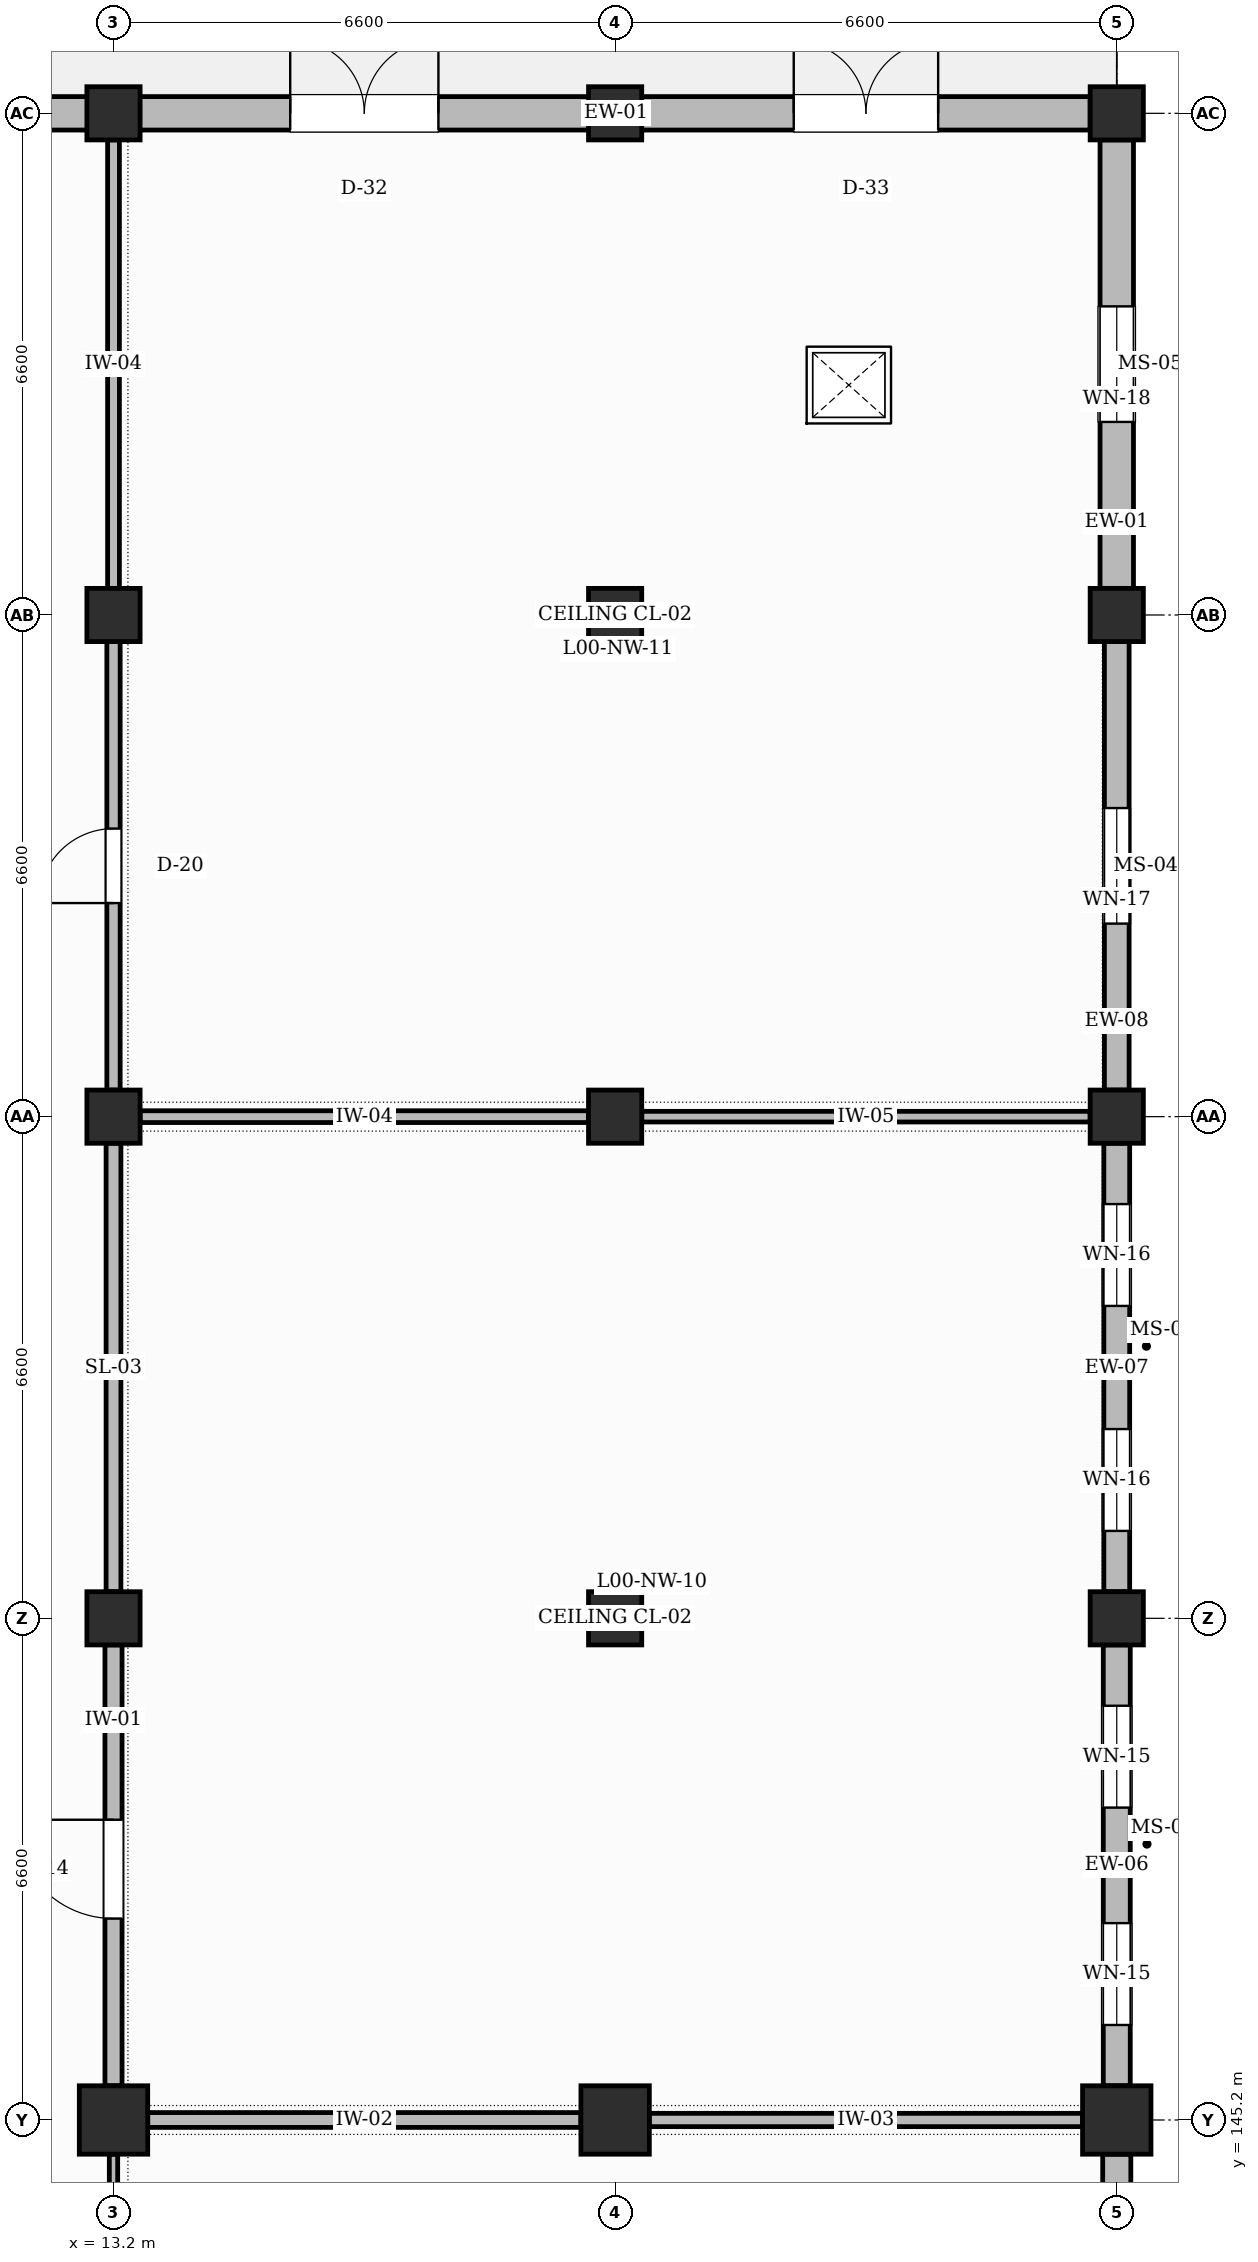
"""IFC4 building model, lengths in metres.
Left out: names, types, materials, properties, quantities, classifications, styles, units other than length and angle.
Written with IfcOpenShell. Run it as: python <this file> out.ifc"""

import sys

from ifc_helpers import new_model, si_unit, direction, frame, frame_2d, origin, origin_2d, place, context, subcontext, project, spatial, rectangle, circle, extrude, element, fill, save


model = new_model("IFC4")
c1 = context("Model", 3, precision=1e-05, world=origin(), true_north=direction((0.0, 1.0)))
c2 = subcontext(c1, "Body", "Model", "MODEL_VIEW")
j1 = project(units=[si_unit("LENGTHUNIT", "METRE"), si_unit("PLANEANGLEUNIT", "RADIAN")], contexts=[c1])
p1 = place(None, origin())
s1 = spatial("IfcSite", under=j1, at=p1, CompositionType="ELEMENT")
p2 = place(p1, origin())
s2 = spatial("IfcBuilding", under=s1, at=p2, CompositionType="ELEMENT")
p3 = place(p2, origin())
s3 = spatial("IfcBuildingStorey", under=s2, at=p3, CompositionType="ELEMENT", Elevation=0.0)
p4 = place(p3, frame((13.2, 145.2, 0.0), z_axis=(0.0, 0.0, 1.0), x_axis=(1.0, 0.0, 0.0)))
e1 = element("IfcColumn", 1, at=p4, inside=s3, PredefinedType="COLUMN", context=c2, shape_type="SweptSolid", body=[
    extrude(rectangle(XDim=0.9, YDim=0.9, at=origin_2d()), origin(), (0.0, 0.0, 1.0), 5.4),
])
for number, where, z_axis, x_axis in (
    (2, (13.2, 151.8, 0.0), (0.0, 0.0, 1.0), (1.0, 0.0, 0.0)),
    (3, (13.2, 158.4, 0.0), (0.0, 0.0, 1.0), (1.0, 0.0, 0.0)),
    (4, (13.2, 165.0, 0.0), (0.0, 0.0, 1.0), (1.0, 0.0, 0.0)),
    (5, (13.2, 171.6, 0.0), (0.0, 0.0, 1.0), (1.0, 0.0, 0.0)),
):
    element("IfcColumn", number, at=place(p3, frame(where, z_axis=z_axis, x_axis=x_axis)), inside=s3, PredefinedType="COLUMN", context=c2, shape_type="SweptSolid", body=[
        extrude(circle(Radius=0.35, at=origin_2d()), origin(), (0.0, 0.0, 1.0), 5.4),
    ])
p5 = place(p3, frame((19.8, 145.2, 0.0), z_axis=(0.0, 0.0, 1.0), x_axis=(1.0, 0.0, 0.0)))
e6 = element("IfcColumn", 6, at=p5, inside=s3, PredefinedType="COLUMN", context=c2, shape_type="SweptSolid", body=[
    extrude(rectangle(XDim=0.9, YDim=0.9, at=origin_2d()), origin(), (0.0, 0.0, 1.0), 5.4),
])
for number, where, z_axis, x_axis in (
    (7, (19.8, 151.8, 0.0), (0.0, 0.0, 1.0), (1.0, 0.0, 0.0)),
    (8, (19.8, 158.4, 0.0), (0.0, 0.0, 1.0), (1.0, 0.0, 0.0)),
    (9, (19.8, 165.0, 0.0), (0.0, 0.0, 1.0), (1.0, 0.0, 0.0)),
    (10, (19.8, 171.6, 0.0), (0.0, 0.0, 1.0), (1.0, 0.0, 0.0)),
):
    element("IfcColumn", number, at=place(p3, frame(where, z_axis=z_axis, x_axis=x_axis)), inside=s3, PredefinedType="COLUMN", context=c2, shape_type="SweptSolid", body=[
        extrude(circle(Radius=0.35, at=origin_2d()), origin(), (0.0, 0.0, 1.0), 5.4),
    ])
p6 = place(p3, frame((26.4, 145.2, 0.0), z_axis=(0.0, 0.0, 1.0), x_axis=(1.0, 0.0, 0.0)))
e11 = element("IfcColumn", 11, at=p6, inside=s3, PredefinedType="COLUMN", context=c2, shape_type="SweptSolid", body=[
    extrude(rectangle(XDim=0.9, YDim=0.9, at=origin_2d()), origin(), (0.0, 0.0, 1.0), 5.4),
])
for number, where, z_axis, x_axis in (
    (12, (26.4, 151.8, 0.0), (0.0, 0.0, 1.0), (1.0, 0.0, 0.0)),
    (13, (26.4, 158.4, 0.0), (0.0, 0.0, 1.0), (1.0, 0.0, 0.0)),
    (14, (26.4, 165.0, 0.0), (0.0, 0.0, 1.0), (1.0, 0.0, 0.0)),
    (15, (26.4, 171.6, 0.0), (0.0, 0.0, 1.0), (1.0, 0.0, 0.0)),
):
    element("IfcColumn", number, at=place(p3, frame(where, z_axis=z_axis, x_axis=x_axis)), inside=s3, PredefinedType="COLUMN", context=c2, shape_type="SweptSolid", body=[
        extrude(circle(Radius=0.35, at=origin_2d()), origin(), (0.0, 0.0, 1.0), 5.4),
    ])
p7 = place(p3, frame((6.95, 171.6, 0.0), z_axis=(0.0, 0.0, 1.0), x_axis=(1.0, 0.0, 0.0)))
e16 = element("IfcWall", 16, at=p7, inside=s3, PredefinedType="SOLIDWALL", context=c2, shape_type="SweptSolid", body=[
    extrude(rectangle(XDim=5.9, YDim=0.44, at=frame_2d((2.95, 0.0))), origin(), (0.0, 0.0, 1.0), 4.45),
])
p8 = place(p7, frame((1.95, 0.0, 0.0)))
e17 = element("IfcOpeningElement", 17, at=p8, cuts=e16, PredefinedType="OPENING", context=c2, shape_type="SweptSolid", body=[
    extrude(rectangle(XDim=2.0, YDim=2.5, at=frame_2d((1.0, 1.25))), frame((0.0, 0.23, 0.0), z_axis=(0.0, -1.0, 0.0), x_axis=(1.0, 0.0, 0.0)), (0.0, 0.0, 1.0), 0.46),
])
p9 = place(p3, frame((13.55, 171.6, 0.0), z_axis=(0.0, 0.0, 1.0), x_axis=(1.0, 0.0, 0.0)))
e18 = element("IfcWall", 18, at=p9, inside=s3, PredefinedType="SOLIDWALL", context=c2, shape_type="SweptSolid", body=[
    extrude(rectangle(XDim=5.9, YDim=0.44, at=frame_2d((2.95, 0.0))), origin(), (0.0, 0.0, 1.0), 4.45),
])
p10 = place(p9, frame((1.975, 0.0, 0.0)))
e19 = element("IfcOpeningElement", 19, at=p10, cuts=e18, PredefinedType="OPENING", context=c2, shape_type="SweptSolid", body=[
    extrude(rectangle(XDim=1.95, YDim=2.45, at=frame_2d((0.975, 1.225))), frame((0.0, 0.23, 0.0), z_axis=(0.0, -1.0, 0.0), x_axis=(1.0, 0.0, 0.0)), (0.0, 0.0, 1.0), 0.46),
])
p11 = place(p3, frame((26.4, 139.05, 0.0), z_axis=(0.0, 0.0, 1.0), x_axis=(0.0, 1.0, 0.0)))
e20 = element("IfcWall", 20, at=p11, inside=s3, PredefinedType="SOLIDWALL", context=c2, shape_type="SweptSolid", body=[
    extrude(rectangle(XDim=5.7, YDim=0.37, at=frame_2d((2.85, 0.0))), origin(), (0.0, 0.0, 1.0), 4.45),
])
p12 = place(p11, frame((0.8, 0.0, 0.95)))
e21 = element("IfcOpeningElement", 21, at=p12, cuts=e20, PredefinedType="OPENING", context=c2, shape_type="SweptSolid", body=[
    extrude(rectangle(XDim=1.34, YDim=1.52, at=frame_2d((0.67, 0.76))), frame((0.0, 0.195, 0.0), z_axis=(0.0, -1.0, 0.0), x_axis=(1.0, 0.0, 0.0)), (0.0, 0.0, 1.0), 0.39),
])
p13 = place(p11, frame((3.56, 0.0, 0.95)))
e22 = element("IfcOpeningElement", 22, at=p13, cuts=e20, PredefinedType="OPENING", context=c2, shape_type="SweptSolid", body=[
    extrude(rectangle(XDim=1.34, YDim=1.52, at=frame_2d((0.67, 0.76))), frame((0.0, 0.195, 0.0), z_axis=(0.0, -1.0, 0.0), x_axis=(1.0, 0.0, 0.0)), (0.0, 0.0, 1.0), 0.39),
])
p14 = place(p3, frame((26.4, 145.65, 0.0), z_axis=(0.0, 0.0, 1.0), x_axis=(0.0, 1.0, 0.0)))
e23 = element("IfcWall", 23, at=p14, inside=s3, PredefinedType="SOLIDWALL", context=c2, shape_type="SweptSolid", body=[
    extrude(rectangle(XDim=5.8, YDim=0.355, at=frame_2d((2.9, 0.0))), origin(), (0.0, 0.0, 1.0), 4.45),
])
p15 = place(p14, frame((0.8, 0.0, 0.95)))
e24 = element("IfcOpeningElement", 24, at=p15, cuts=e23, PredefinedType="OPENING", context=c2, shape_type="SweptSolid", body=[
    extrude(rectangle(XDim=1.34, YDim=1.74, at=frame_2d((0.67, 0.87))), frame((0.0, 0.188, 0.0), z_axis=(0.0, -1.0, 0.0), x_axis=(1.0, 0.0, 0.0)), (0.0, 0.0, 1.0), 0.375),
])
p16 = place(p14, frame((3.66, 0.0, 0.95)))
e25 = element("IfcOpeningElement", 25, at=p16, cuts=e23, PredefinedType="OPENING", context=c2, shape_type="SweptSolid", body=[
    extrude(rectangle(XDim=1.34, YDim=1.74, at=frame_2d((0.67, 0.87))), frame((0.0, 0.188, 0.0), z_axis=(0.0, -1.0, 0.0), x_axis=(1.0, 0.0, 0.0)), (0.0, 0.0, 1.0), 0.375),
])
p17 = place(p3, frame((26.4, 152.15, 0.0), z_axis=(0.0, 0.0, 1.0), x_axis=(0.0, 1.0, 0.0)))
e26 = element("IfcWall", 26, at=p17, inside=s3, PredefinedType="SOLIDWALL", context=c2, shape_type="SweptSolid", body=[
    extrude(rectangle(XDim=5.9, YDim=0.34, at=frame_2d((2.95, 0.0))), origin(), (0.0, 0.0, 1.0), 4.45),
])
p18 = place(p17, frame((0.8, 0.0, 0.95)))
e27 = element("IfcOpeningElement", 27, at=p18, cuts=e26, PredefinedType="OPENING", context=c2, shape_type="SweptSolid", body=[
    extrude(rectangle(XDim=1.34, YDim=1.96, at=frame_2d((0.67, 0.98))), frame((0.0, 0.18, 0.0), z_axis=(0.0, -1.0, 0.0), x_axis=(1.0, 0.0, 0.0)), (0.0, 0.0, 1.0), 0.36),
])
p19 = place(p17, frame((3.76, 0.0, 0.95)))
e28 = element("IfcOpeningElement", 28, at=p19, cuts=e26, PredefinedType="OPENING", context=c2, shape_type="SweptSolid", body=[
    extrude(rectangle(XDim=1.34, YDim=1.96, at=frame_2d((0.67, 0.98))), frame((0.0, 0.18, 0.0), z_axis=(0.0, -1.0, 0.0), x_axis=(1.0, 0.0, 0.0)), (0.0, 0.0, 1.0), 0.36),
])
p20 = place(p3, frame((26.4, 158.75, 0.0), z_axis=(0.0, 0.0, 1.0), x_axis=(0.0, 1.0, 0.0)))
e29 = element("IfcWall", 29, at=p20, inside=s3, PredefinedType="SOLIDWALL", context=c2, shape_type="SweptSolid", body=[
    extrude(rectangle(XDim=5.9, YDim=0.325, at=frame_2d((2.95, 0.0))), origin(), (0.0, 0.0, 1.0), 4.45),
])
p21 = place(p20, frame((2.19, 0.0, 0.95)))
e30 = element("IfcOpeningElement", 30, at=p21, cuts=e29, PredefinedType="OPENING", context=c2, shape_type="SweptSolid", body=[
    extrude(rectangle(XDim=1.52, YDim=1.3, at=frame_2d((0.76, 0.65))), frame((0.0, 0.172, 0.0), z_axis=(0.0, -1.0, 0.0), x_axis=(1.0, 0.0, 0.0)), (0.0, 0.0, 1.0), 0.345),
])
p22 = place(p3, frame((20.15, 171.6, 0.0), z_axis=(0.0, 0.0, 1.0), x_axis=(1.0, 0.0, 0.0)))
e31 = element("IfcWall", 31, at=p22, inside=s3, PredefinedType="SOLIDWALL", context=c2, shape_type="SweptSolid", body=[
    extrude(rectangle(XDim=5.9, YDim=0.44, at=frame_2d((2.95, 0.0))), origin(), (0.0, 0.0, 1.0), 4.45),
])
p23 = place(p22, frame((2.0, 0.0, 0.0)))
e32 = element("IfcOpeningElement", 32, at=p23, cuts=e31, PredefinedType="OPENING", context=c2, shape_type="SweptSolid", body=[
    extrude(rectangle(XDim=1.9, YDim=2.4, at=frame_2d((0.95, 1.2))), frame((0.0, 0.23, 0.0), z_axis=(0.0, -1.0, 0.0), x_axis=(1.0, 0.0, 0.0)), (0.0, 0.0, 1.0), 0.46),
])
p24 = place(p3, frame((26.4, 165.35, 0.0), z_axis=(0.0, 0.0, 1.0), x_axis=(0.0, 1.0, 0.0)))
e33 = element("IfcWall", 33, at=p24, inside=s3, PredefinedType="SOLIDWALL", context=c2, shape_type="SweptSolid", body=[
    extrude(rectangle(XDim=5.9, YDim=0.44, at=frame_2d((2.95, 0.0))), origin(), (0.0, 0.0, 1.0), 4.45),
])
p25 = place(p24, frame((2.19, 0.0, 0.95)))
e34 = element("IfcOpeningElement", 34, at=p25, cuts=e33, PredefinedType="OPENING", context=c2, shape_type="SweptSolid", body=[
    extrude(rectangle(XDim=1.52, YDim=1.52, at=frame_2d((0.76, 0.76))), frame((0.0, 0.23, 0.0), z_axis=(0.0, -1.0, 0.0), x_axis=(1.0, 0.0, 0.0)), (0.0, 0.0, 1.0), 0.46),
])
p26 = place(p3, frame((13.2, 139.05, 0.0), z_axis=(0.0, 0.0, 1.0), x_axis=(0.0, 1.0, 0.0)))
e35 = element("IfcWall", 35, at=p26, inside=s3, PredefinedType="PARTITIONING", context=c2, shape_type="SweptSolid", body=[
    extrude(rectangle(XDim=5.7, YDim=0.11, at=frame_2d((2.85, 0.0))), origin(), (0.0, 0.0, 1.0), 4.3),
])
p27 = place(p3, frame((13.2, 145.65, 0.0), z_axis=(0.0, 0.0, 1.0), x_axis=(0.0, 1.0, 0.0)))
e36 = element("IfcWall", 36, at=p27, inside=s3, PredefinedType="PARTITIONING", context=c2, shape_type="SweptSolid", body=[
    extrude(rectangle(XDim=5.8, YDim=0.225, at=frame_2d((2.9, 0.0))), origin(), (0.0, 0.0, 1.0), 4.3),
])
p28 = place(p27, frame((2.2, 0.0, 0.0)))
e37 = element("IfcOpeningElement", 37, at=p28, cuts=e36, PredefinedType="OPENING", context=c2, shape_type="SweptSolid", body=[
    extrude(rectangle(XDim=1.3, YDim=2.3, at=frame_2d((0.65, 1.15))), frame((0.0, 0.123, 0.0), z_axis=(0.0, -1.0, 0.0), x_axis=(1.0, 0.0, 0.0)), (0.0, 0.0, 1.0), 0.245),
])
p29 = place(p3, frame((13.2, 152.15, 0.0), z_axis=(0.0, 0.0, 1.0), x_axis=(0.0, 1.0, 0.0)))
e38 = element("IfcWall", 38, at=p29, inside=s3, PredefinedType="PARTITIONING", context=c2, shape_type="SweptSolid", body=[
    extrude(rectangle(XDim=5.9, YDim=0.195, at=frame_2d((2.95, 0.0))), origin(), (0.0, 0.0, 1.0), 4.3),
])
p30 = place(p3, frame((13.2, 158.75, 0.0), z_axis=(0.0, 0.0, 1.0), x_axis=(0.0, 1.0, 0.0)))
e39 = element("IfcWall", 39, at=p30, inside=s3, PredefinedType="PARTITIONING", context=c2, shape_type="SweptSolid", body=[
    extrude(rectangle(XDim=5.9, YDim=0.175, at=frame_2d((2.95, 0.0))), origin(), (0.0, 0.0, 1.0), 4.3),
])
p31 = place(p30, frame((2.46, 0.0, 0.0)))
e40 = element("IfcOpeningElement", 40, at=p31, cuts=e39, PredefinedType="OPENING", context=c2, shape_type="SweptSolid", body=[
    extrude(rectangle(XDim=0.98, YDim=2.15, at=frame_2d((0.49, 1.075))), frame((0.0, 0.097, 0.0), z_axis=(0.0, -1.0, 0.0), x_axis=(1.0, 0.0, 0.0)), (0.0, 0.0, 1.0), 0.195),
])
p32 = place(p3, frame((13.2, 165.35, 0.0), z_axis=(0.0, 0.0, 1.0), x_axis=(0.0, 1.0, 0.0)))
e41 = element("IfcWall", 41, at=p32, inside=s3, PredefinedType="PARTITIONING", context=c2, shape_type="SweptSolid", body=[
    extrude(rectangle(XDim=5.9, YDim=0.155, at=frame_2d((2.95, 0.0))), origin(), (0.0, 0.0, 1.0), 4.3),
])
p33 = place(p3, frame((13.65, 145.2, 0.0), z_axis=(0.0, 0.0, 1.0), x_axis=(1.0, 0.0, 0.0)))
e42 = element("IfcWall", 42, at=p33, inside=s3, PredefinedType="PARTITIONING", context=c2, shape_type="SweptSolid", body=[
    extrude(rectangle(XDim=5.7, YDim=0.195, at=frame_2d((2.85, 0.0))), origin(), (0.0, 0.0, 1.0), 4.2),
])
p34 = place(p3, frame((13.55, 158.4, 0.0), z_axis=(0.0, 0.0, 1.0), x_axis=(1.0, 0.0, 0.0)))
e43 = element("IfcWall", 43, at=p34, inside=s3, PredefinedType="PARTITIONING", context=c2, shape_type="SweptSolid", body=[
    extrude(rectangle(XDim=5.9, YDim=0.155, at=frame_2d((2.95, 0.0))), origin(), (0.0, 0.0, 1.0), 4.2),
])
p35 = place(p3, frame((20.25, 145.2, 0.0), z_axis=(0.0, 0.0, 1.0), x_axis=(1.0, 0.0, 0.0)))
e44 = element("IfcWall", 44, at=p35, inside=s3, PredefinedType="PARTITIONING", context=c2, shape_type="SweptSolid", body=[
    extrude(rectangle(XDim=5.7, YDim=0.175, at=frame_2d((2.85, 0.0))), origin(), (0.0, 0.0, 1.0), 4.3),
])
p36 = place(p3, frame((20.15, 158.4, 0.0), z_axis=(0.0, 0.0, 1.0), x_axis=(1.0, 0.0, 0.0)))
e45 = element("IfcWall", 45, at=p36, inside=s3, PredefinedType="PARTITIONING", context=c2, shape_type="SweptSolid", body=[
    extrude(rectangle(XDim=5.9, YDim=0.14, at=frame_2d((2.95, 0.0))), origin(), (0.0, 0.0, 1.0), 4.3),
])
p37 = place(p10, origin())
e46 = element("IfcDoor", 46, at=p37, inside=s3, OperationType="DOUBLE_DOOR_SINGLE_SWING", PredefinedType="DOOR", context=c2, shape_type="SweptSolid", body=[
    extrude(rectangle(XDim=1.95, YDim=2.45, at=frame_2d((0.975, 1.225))), frame((0.0, 0.025, 0.0), z_axis=(0.0, -1.0, 0.0), x_axis=(1.0, 0.0, 0.0)), (0.0, 0.0, 1.0), 0.05),
])
fill(e19, e46)
p38 = place(p15, origin())
e47 = element("IfcWindow", 47, at=p38, inside=s3, PartitioningType="SINGLE_PANEL", PredefinedType="WINDOW", context=c2, shape_type="SweptSolid", body=[
    extrude(rectangle(XDim=1.34, YDim=1.74, at=frame_2d((0.67, 0.87))), frame((0.0, 0.03, 0.0), z_axis=(0.0, -1.0, 0.0), x_axis=(1.0, 0.0, 0.0)), (0.0, 0.0, 1.0), 0.06),
])
fill(e24, e47)
p39 = place(p16, origin())
e48 = element("IfcWindow", 48, at=p39, inside=s3, PartitioningType="SINGLE_PANEL", PredefinedType="WINDOW", context=c2, shape_type="SweptSolid", body=[
    extrude(rectangle(XDim=1.34, YDim=1.74, at=frame_2d((0.67, 0.87))), frame((0.0, 0.03, 0.0), z_axis=(0.0, -1.0, 0.0), x_axis=(1.0, 0.0, 0.0)), (0.0, 0.0, 1.0), 0.06),
])
fill(e25, e48)
p40 = place(p18, origin())
e49 = element("IfcWindow", 49, at=p40, inside=s3, PartitioningType="SINGLE_PANEL", PredefinedType="WINDOW", context=c2, shape_type="SweptSolid", body=[
    extrude(rectangle(XDim=1.34, YDim=1.96, at=frame_2d((0.67, 0.98))), frame((0.0, 0.03, 0.0), z_axis=(0.0, -1.0, 0.0), x_axis=(1.0, 0.0, 0.0)), (0.0, 0.0, 1.0), 0.06),
])
fill(e27, e49)
p41 = place(p19, origin())
e50 = element("IfcWindow", 50, at=p41, inside=s3, PartitioningType="SINGLE_PANEL", PredefinedType="WINDOW", context=c2, shape_type="SweptSolid", body=[
    extrude(rectangle(XDim=1.34, YDim=1.96, at=frame_2d((0.67, 0.98))), frame((0.0, 0.03, 0.0), z_axis=(0.0, -1.0, 0.0), x_axis=(1.0, 0.0, 0.0)), (0.0, 0.0, 1.0), 0.06),
])
fill(e28, e50)
p42 = place(p21, origin())
e51 = element("IfcWindow", 51, at=p42, inside=s3, PartitioningType="DOUBLE_PANEL_VERTICAL", PredefinedType="WINDOW", context=c2, shape_type="SweptSolid", body=[
    extrude(rectangle(XDim=1.52, YDim=1.3, at=frame_2d((0.76, 0.65))), frame((0.0, 0.03, 0.0), z_axis=(0.0, -1.0, 0.0), x_axis=(1.0, 0.0, 0.0)), (0.0, 0.0, 1.0), 0.06),
])
fill(e30, e51)
p43 = place(p23, origin())
e52 = element("IfcDoor", 52, at=p43, inside=s3, OperationType="DOUBLE_DOOR_SINGLE_SWING", PredefinedType="DOOR", context=c2, shape_type="SweptSolid", body=[
    extrude(rectangle(XDim=1.9, YDim=2.4, at=frame_2d((0.95, 1.2))), frame((0.0, 0.025, 0.0), z_axis=(0.0, -1.0, 0.0), x_axis=(1.0, 0.0, 0.0)), (0.0, 0.0, 1.0), 0.05),
])
fill(e32, e52)
p44 = place(p25, origin())
e53 = element("IfcWindow", 53, at=p44, inside=s3, PartitioningType="DOUBLE_PANEL_VERTICAL", PredefinedType="WINDOW", context=c2, shape_type="SweptSolid", body=[
    extrude(rectangle(XDim=1.52, YDim=1.52, at=frame_2d((0.76, 0.76))), frame((0.0, 0.03, 0.0), z_axis=(0.0, -1.0, 0.0), x_axis=(1.0, 0.0, 0.0)), (0.0, 0.0, 1.0), 0.06),
])
fill(e34, e53)
p45 = place(p28, origin())
e54 = element("IfcDoor", 54, at=p45, inside=s3, OperationType="SINGLE_SWING_RIGHT", PredefinedType="DOOR", context=c2, shape_type="SweptSolid", body=[
    extrude(rectangle(XDim=1.3, YDim=2.3, at=frame_2d((0.65, 1.15))), frame((0.0, 0.025, 0.0), z_axis=(0.0, -1.0, 0.0), x_axis=(1.0, 0.0, 0.0)), (0.0, 0.0, 1.0), 0.05),
])
fill(e37, e54)
p46 = place(p31, origin())
e55 = element("IfcDoor", 55, at=p46, inside=s3, OperationType="SINGLE_SWING_LEFT", PredefinedType="DOOR", context=c2, shape_type="SweptSolid", body=[
    extrude(rectangle(XDim=0.98, YDim=2.15, at=frame_2d((0.49, 1.075))), frame((0.0, 0.025, 0.0), z_axis=(0.0, -1.0, 0.0), x_axis=(1.0, 0.0, 0.0)), (0.0, 0.0, 1.0), 0.05),
])
fill(e40, e55)
save(model, sys.argv[1])
